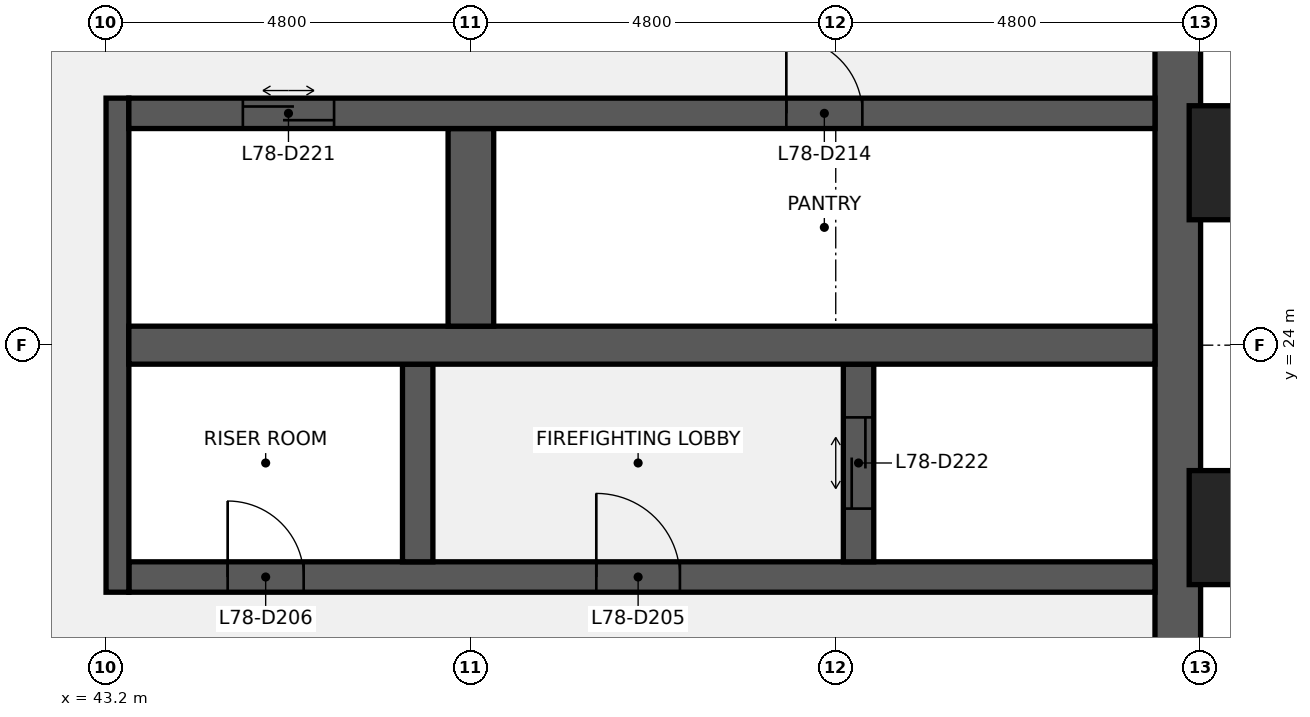
"""IFC4 building model, lengths in metres.
Left out: names, types, materials, properties, quantities, classifications, styles, units other than length and angle.
Written with IfcOpenShell. Run it as: python <this file> out.ifc"""

import sys

from ifc_helpers import new_model, si_unit, direction, frame, frame_2d, origin, origin_2d, place, context, subcontext, project, spatial, rectangle, extrude, element, fill, save


model = new_model("IFC4")
c1 = context("Model", 3, precision=1e-05, world=origin(), true_north=direction((0.0, 1.0)))
c2 = subcontext(c1, "Body", "Model", "MODEL_VIEW")
j1 = project(units=[si_unit("LENGTHUNIT", "METRE"), si_unit("PLANEANGLEUNIT", "RADIAN")], contexts=[c1])
p1 = place(None, origin())
s1 = spatial("IfcSite", under=j1, at=p1, CompositionType="ELEMENT")
p2 = place(p1, origin())
s2 = spatial("IfcBuilding", under=s1, at=p2, CompositionType="ELEMENT")
p3 = place(p2, frame((0.0, 0.0, 350.3)))
s3 = spatial("IfcBuildingStorey", under=s2, at=p3, CompositionType="ELEMENT", Elevation=350.3)
p4 = place(p3, frame((57.3, 38.4, 0.0), z_axis=(0.0, 0.0, 1.0), x_axis=(0.0, -1.0, 0.0)))
e1 = element("IfcWall", 1, at=p4, inside=s3, PredefinedType="SHEAR", context=c2, shape_type="SweptSolid", body=[
    extrude(rectangle(XDim=28.8, YDim=0.6, at=frame_2d((14.4, 0.0))), origin(), (0.0, 0.0, 1.0), 3.75),
])
p5 = place(p4, frame((18.45, 0.0, 0.9)))
e2 = element("IfcOpeningElement", 2, at=p5, cuts=e1, PredefinedType="OPENING", context=c2, shape_type="SweptSolid", body=[
    extrude(rectangle(XDim=1.5, YDim=1.5, at=frame_2d((0.75, 0.75))), frame((0.0, 0.31, 0.0), z_axis=(0.0, -1.0, 0.0), x_axis=(1.0, 0.0, 0.0)), (0.0, 0.0, 1.0), 0.62),
])
p6 = place(p4, frame((8.85, 0.0, 0.9)))
e3 = element("IfcOpeningElement", 3, at=p6, cuts=e1, PredefinedType="OPENING", context=c2, shape_type="SweptSolid", body=[
    extrude(rectangle(XDim=1.5, YDim=1.5, at=frame_2d((0.75, 0.75))), frame((0.0, 0.31, 0.0), z_axis=(0.0, -1.0, 0.0), x_axis=(1.0, 0.0, 0.0)), (0.0, 0.0, 1.0), 0.62),
])
p7 = place(p3, frame((43.5, 20.95, 0.0), z_axis=(0.0, 0.0, 1.0), x_axis=(1.0, 0.0, 0.0)))
e4 = element("IfcWall", 4, at=p7, inside=s3, PredefinedType="SHEAR", context=c2, shape_type="SweptSolid", body=[
    extrude(rectangle(XDim=13.5, YDim=0.4, at=frame_2d((6.75, 0.0))), origin(), (0.0, 0.0, 1.0), 3.75),
])
p8 = place(p7, frame((6.15, 0.0, 0.0)))
e5 = element("IfcOpeningElement", 5, at=p8, cuts=e4, PredefinedType="OPENING", context=c2, shape_type="SweptSolid", body=[
    extrude(rectangle(XDim=1.1, YDim=2.1, at=frame_2d((0.55, 1.05))), frame((0.0, 0.21, 0.0), z_axis=(0.0, -1.0, 0.0), x_axis=(1.0, 0.0, 0.0)), (0.0, 0.0, 1.0), 0.42),
])
p9 = place(p7, frame((1.3, 0.0, 0.0)))
e6 = element("IfcOpeningElement", 6, at=p9, cuts=e4, PredefinedType="OPENING", context=c2, shape_type="SweptSolid", body=[
    extrude(rectangle(XDim=1.0, YDim=2.1, at=frame_2d((0.5, 1.05))), frame((0.0, 0.21, 0.0), z_axis=(0.0, -1.0, 0.0), x_axis=(1.0, 0.0, 0.0)), (0.0, 0.0, 1.0), 0.42),
])
p10 = place(p3, frame((43.35, 20.75, 0.0), z_axis=(0.0, 0.0, 1.0), x_axis=(0.0, 1.0, 0.0)))
e7 = element("IfcWall", 7, at=p10, inside=s3, PredefinedType="SHEAR", context=c2, shape_type="SweptSolid", body=[
    extrude(rectangle(XDim=6.5, YDim=0.3, at=frame_2d((3.25, 0.0))), origin(), (0.0, 0.0, 1.0), 3.75),
])
p11 = place(p3, frame((53.1, 21.15, 0.0), z_axis=(0.0, 0.0, 1.0), x_axis=(0.0, 1.0, 0.0)))
e8 = element("IfcWall", 8, at=p11, inside=s3, PredefinedType="SHEAR", context=c2, shape_type="SweptSolid", body=[
    extrude(rectangle(XDim=2.6, YDim=0.4, at=frame_2d((1.3, 0.0))), origin(), (0.0, 0.0, 1.0), 3.75),
])
p12 = place(p11, frame((0.7, 0.0, 0.0)))
e9 = element("IfcOpeningElement", 9, at=p12, cuts=e8, PredefinedType="OPENING", context=c2, shape_type="SweptSolid", body=[
    extrude(rectangle(XDim=1.2, YDim=2.1, at=frame_2d((0.6, 1.05))), frame((0.0, 0.21, 0.0), z_axis=(0.0, -1.0, 0.0), x_axis=(1.0, 0.0, 0.0)), (0.0, 0.0, 1.0), 0.42),
])
p13 = place(p3, frame((47.3, 21.15, 0.0), z_axis=(0.0, 0.0, 1.0), x_axis=(0.0, 1.0, 0.0)))
e10 = element("IfcWall", 10, at=p13, inside=s3, PredefinedType="SHEAR", context=c2, shape_type="SweptSolid", body=[
    extrude(rectangle(XDim=2.6, YDim=0.4, at=frame_2d((1.3, 0.0))), origin(), (0.0, 0.0, 1.0), 3.75),
])
p14 = place(p3, frame((43.5, 24.0, 0.0), z_axis=(0.0, 0.0, 1.0), x_axis=(1.0, 0.0, 0.0)))
e11 = element("IfcWall", 11, at=p14, inside=s3, PredefinedType="SHEAR", context=c2, shape_type="SweptSolid", body=[
    extrude(rectangle(XDim=13.5, YDim=0.5, at=frame_2d((6.75, 0.0))), origin(), (0.0, 0.0, 1.0), 3.75),
])
p15 = place(p3, frame((48.0, 24.25, 0.0), z_axis=(0.0, 0.0, 1.0), x_axis=(0.0, 1.0, 0.0)))
e12 = element("IfcWall", 12, at=p15, inside=s3, PredefinedType="SHEAR", context=c2, shape_type="SweptSolid", body=[
    extrude(rectangle(XDim=2.6, YDim=0.6, at=frame_2d((1.3, 0.0))), origin(), (0.0, 0.0, 1.0), 3.75),
])
p16 = place(p3, frame((43.5, 27.05, 0.0), z_axis=(0.0, 0.0, 1.0), x_axis=(1.0, 0.0, 0.0)))
e13 = element("IfcWall", 13, at=p16, inside=s3, PredefinedType="SHEAR", context=c2, shape_type="SweptSolid", body=[
    extrude(rectangle(XDim=13.5, YDim=0.4, at=frame_2d((6.75, 0.0))), origin(), (0.0, 0.0, 1.0), 3.75),
])
p17 = place(p16, frame((8.65, 0.0, 0.0)))
e14 = element("IfcOpeningElement", 14, at=p17, cuts=e13, PredefinedType="OPENING", context=c2, shape_type="SweptSolid", body=[
    extrude(rectangle(XDim=1.0, YDim=2.1, at=frame_2d((0.5, 1.05))), frame((0.0, 0.21, 0.0), z_axis=(0.0, -1.0, 0.0), x_axis=(1.0, 0.0, 0.0)), (0.0, 0.0, 1.0), 0.42),
])
p18 = place(p16, frame((1.5, 0.0, 0.0)))
e15 = element("IfcOpeningElement", 15, at=p18, cuts=e13, PredefinedType="OPENING", context=c2, shape_type="SweptSolid", body=[
    extrude(rectangle(XDim=1.2, YDim=2.1, at=frame_2d((0.6, 1.05))), frame((0.0, 0.21, 0.0), z_axis=(0.0, -1.0, 0.0), x_axis=(1.0, 0.0, 0.0)), (0.0, 0.0, 1.0), 0.42),
])
for number, where, z_axis, x_axis in (
    (16, (58.35, 21.6, 0.0), (0.0, 0.0, 1.0), (0.0, 1.0, 0.0)),
    (17, (58.35, 26.4, 0.0), (0.0, 0.0, 1.0), (0.0, 1.0, 0.0)),
):
    element("IfcColumn", number, at=place(p3, frame(where, z_axis=z_axis, x_axis=x_axis)), inside=s3, PredefinedType="PILASTER", context=c2, shape_type="SweptSolid", body=[
        extrude(rectangle(XDim=1.8, YDim=1.5, at=origin_2d()), origin(), (0.0, 0.0, 1.0), 4.0),
    ])
p19 = place(p8, origin())
e18 = element("IfcDoor", 18, at=p19, inside=s3, OperationType="SINGLE_SWING_LEFT", PredefinedType="DOOR", context=c2, shape_type="SweptSolid", body=[
    extrude(rectangle(XDim=1.1, YDim=2.1, at=frame_2d((0.55, 1.05))), frame((0.0, 0.025, 0.0), z_axis=(0.0, -1.0, 0.0), x_axis=(1.0, 0.0, 0.0)), (0.0, 0.0, 1.0), 0.05),
])
fill(e5, e18)
p20 = place(p9, origin())
e19 = element("IfcDoor", 19, at=p20, inside=s3, OperationType="SINGLE_SWING_LEFT", PredefinedType="DOOR", context=c2, shape_type="SweptSolid", body=[
    extrude(rectangle(XDim=1.0, YDim=2.1, at=frame_2d((0.5, 1.05))), frame((0.0, 0.025, 0.0), z_axis=(0.0, -1.0, 0.0), x_axis=(1.0, 0.0, 0.0)), (0.0, 0.0, 1.0), 0.05),
])
fill(e6, e19)
p21 = place(p17, origin())
e20 = element("IfcDoor", 20, at=p21, inside=s3, OperationType="SINGLE_SWING_LEFT", PredefinedType="DOOR", context=c2, shape_type="SweptSolid", body=[
    extrude(rectangle(XDim=1.0, YDim=2.1, at=frame_2d((0.5, 1.05))), frame((0.0, 0.025, 0.0), z_axis=(0.0, -1.0, 0.0), x_axis=(1.0, 0.0, 0.0)), (0.0, 0.0, 1.0), 0.05),
])
fill(e14, e20)
p22 = place(p18, origin())
e21 = element("IfcDoor", 21, at=p22, inside=s3, OperationType="DOUBLE_DOOR_SLIDING", PredefinedType="DOOR", context=c2, shape_type="SweptSolid", body=[
    extrude(rectangle(XDim=1.2, YDim=2.1, at=frame_2d((0.6, 1.05))), frame((0.0, 0.025, 0.0), z_axis=(0.0, -1.0, 0.0), x_axis=(1.0, 0.0, 0.0)), (0.0, 0.0, 1.0), 0.05),
])
fill(e15, e21)
p23 = place(p12, origin())
e22 = element("IfcDoor", 22, at=p23, inside=s3, OperationType="DOUBLE_DOOR_SLIDING", PredefinedType="DOOR", context=c2, shape_type="SweptSolid", body=[
    extrude(rectangle(XDim=1.2, YDim=2.1, at=frame_2d((0.6, 1.05))), frame((0.0, 0.025, 0.0), z_axis=(0.0, -1.0, 0.0), x_axis=(1.0, 0.0, 0.0)), (0.0, 0.0, 1.0), 0.05),
])
fill(e9, e22)
save(model, sys.argv[1])
